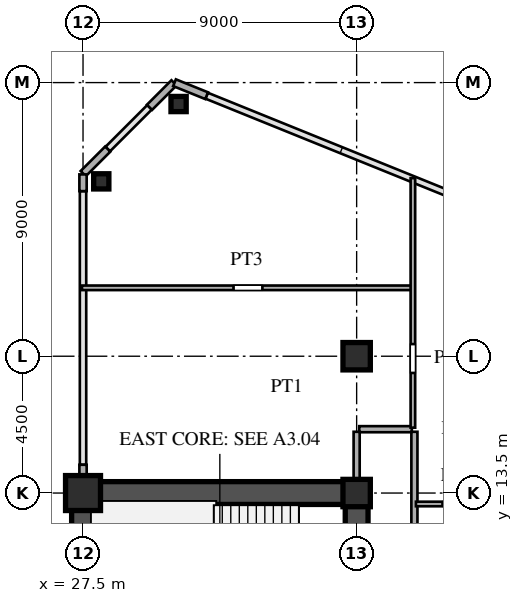
"""IFC4 building model, lengths in metres.
Left out: names, types, materials, properties, quantities, classifications, styles, units other than length and angle.
Written with IfcOpenShell. Run it as: python <this file> out.ifc"""

import sys

from ifc_helpers import new_model, si_unit, direction, frame, frame_2d, origin, origin_2d, place, context, subcontext, project, spatial, rectangle, hollow_rectangle, i_section, extrude, source, transform, mapped, element, save


model = new_model("IFC4")
c1 = context("Model", 3, precision=1e-05, world=origin(), true_north=direction((0.0, 1.0)))
c2 = subcontext(c1, "Body", "Model", "MODEL_VIEW")
j1 = project(units=[si_unit("LENGTHUNIT", "METRE"), si_unit("PLANEANGLEUNIT", "RADIAN")], contexts=[c1])
p1 = place(None, origin())
s1 = spatial("IfcSite", under=j1, at=p1, CompositionType="ELEMENT")
p2 = place(p1, origin())
s2 = spatial("IfcBuilding", under=s1, at=p2, CompositionType="ELEMENT")
p3 = place(p2, frame((0.0, 0.0, 26.1)))
s3 = spatial("IfcBuildingStorey", under=s2, at=p3, CompositionType="ELEMENT", Elevation=26.1)
m1 = source(origin(), c2, "Body", "SweptSolid", [
    extrude(hollow_rectangle(XDim=1.15, YDim=1.15, WallThickness=0.048, at=origin_2d()), origin(), (0.0, 0.0, 1.0), 3.6),
])
p4 = place(p3, frame((27.5, 13.5, 0.0), z_axis=(0.0, 0.0, 1.0), x_axis=(1.0, 0.0, 0.0)))
e1 = element("IfcColumn", 1, at=p4, inside=s3, PredefinedType="COLUMN", context=c2, shape_type="MappedRepresentation", body=[
    mapped(m1, transform((0.0, 0.0, 0.0), scale=1.0)),
])
m2 = source(origin(), c2, "Body", "SweptSolid", [
    extrude(i_section(OverallWidth=0.9, OverallDepth=0.9, WebThickness=0.036, FlangeThickness=0.055, at=origin_2d()), origin(), (0.0, 0.0, 1.0), 3.6),
])
for number, where, z_axis, x_axis in (
    (2, (36.5, 13.5, 0.0), (0.0, 0.0, 1.0), (1.0, 0.0, 0.0)),
    (3, (36.5, 18.0, 0.0), (0.0, 0.0, 1.0), (1.0, 0.0, 0.0)),
):
    element("IfcColumn", number, at=place(p3, frame(where, z_axis=z_axis, x_axis=x_axis)), inside=s3, PredefinedType="COLUMN", context=c2, shape_type="MappedRepresentation", body=[
        mapped(m2, transform((0.0, 0.0, 0.0), scale=1.0)),
    ])
m3 = source(origin(), c2, "Body", "SweptSolid", [
    extrude(hollow_rectangle(XDim=0.5, YDim=0.5, WallThickness=0.02, at=origin_2d()), origin(), (0.0, 0.0, 1.0), 3.6),
])
for number, where, z_axis, x_axis in (
    (4, (30.643, 26.295, 0.0), (0.0, 0.0, 1.0), (1.0, 0.0, 0.0)),
    (5, (28.1, 23.751, 0.0), (0.0, 0.0, 1.0), (1.0, 0.0, 0.0)),
):
    element("IfcColumn", number, at=place(p3, frame(where, z_axis=z_axis, x_axis=x_axis)), inside=s3, PredefinedType="COLUMN", context=c2, shape_type="MappedRepresentation", body=[
        mapped(m3, transform((0.0, 0.0, 0.0), scale=1.0)),
    ])
p5 = place(p3, frame((31.566, 26.569, 0.0), z_axis=(0.0, 0.0, 1.0), x_axis=(-0.927007103665, 0.375043770452, 0.0)))
e6 = element("IfcWall", 6, at=p5, inside=s3, PredefinedType="SOLIDWALL", context=c2, shape_type="SweptSolid", body=[
    extrude(rectangle(XDim=1.14, YDim=0.24, at=frame_2d((0.57, 0.0))), origin(), (0.0, 0.0, 1.0), 3.38),
])
for number, where, z_axis, x_axis in (
    (7, (30.493, 26.993, 0.0), (0.0, 0.0, 1.0), (-0.707, -0.707, 0.0)),
    (8, (28.313, 24.813, 0.0), (0.0, 0.0, 1.0), (-0.707, -0.707, 0.0)),
):
    element("IfcWall", number, at=place(p3, frame(where, z_axis=z_axis, x_axis=x_axis)), inside=s3, PredefinedType="SOLIDWALL", context=c2, shape_type="SweptSolid", body=[
        extrude(rectangle(XDim=1.14, YDim=0.24, at=frame_2d((0.57, 0.0))), origin(), (0.0, 0.0, 1.0), 3.38),
    ])
p6 = place(p3, frame((27.5, 13.88, 0.0), z_axis=(0.0, 0.0, 1.0), x_axis=(0.0, 1.0, 0.0)))
e9 = element("IfcWall", 9, at=p6, inside=s3, PredefinedType="SOLIDWALL", context=c2, shape_type="SweptSolid", body=[
    extrude(rectangle(XDim=0.55, YDim=0.24, at=frame_2d((0.275, 0.0))), origin(), (0.0, 0.0, 1.0), 2.88),
])
p7 = place(p3, frame((27.5, 23.43, 0.0), z_axis=(0.0, 0.0, 1.0), x_axis=(0.0, 1.0, 0.0)))
e10 = element("IfcWall", 10, at=p7, inside=s3, PredefinedType="SOLIDWALL", context=c2, shape_type="SweptSolid", body=[
    extrude(rectangle(XDim=0.55, YDim=0.24, at=frame_2d((0.275, 0.0))), origin(), (0.0, 0.0, 1.0), 3.38),
])
p8 = place(p3, frame((27.5, 1.3, 0.0), z_axis=(0.0, 0.0, 1.0), x_axis=(0.0, 1.0, 0.0)))
e11 = element("IfcWall", 11, at=p8, inside=s3, PredefinedType="SHEAR", context=c2, shape_type="SweptSolid", body=[
    extrude(rectangle(XDim=12.2, YDim=0.75, at=frame_2d((6.1, 0.0))), origin(), (0.0, 0.0, 1.0), 3.38),
])
p9 = place(p3, frame((27.5, 13.5, 0.0), z_axis=(0.0, 0.0, 1.0), x_axis=(1.0, 0.0, 0.0)))
e12 = element("IfcWall", 12, at=p9, inside=s3, PredefinedType="SHEAR", context=c2, shape_type="SweptSolid", body=[
    extrude(rectangle(XDim=9.0, YDim=0.75, at=frame_2d((4.5, 0.0))), origin(), (0.0, 0.0, 1.0), 3.38),
])
p10 = place(p3, frame((36.5, 8.2, 0.0), z_axis=(0.0, 0.0, 1.0), x_axis=(0.0, 1.0, 0.0)))
e13 = element("IfcWall", 13, at=p10, inside=s3, PredefinedType="SHEAR", context=c2, shape_type="SweptSolid", body=[
    extrude(rectangle(XDim=5.45, YDim=0.75, at=frame_2d((2.725, 0.0))), origin(), (0.0, 0.0, 1.0), 3.38),
])
p11 = place(p10, frame((0.245, 0.0, 0.0)))
e14 = element("IfcOpeningElement", 14, at=p11, cuts=e13, PredefinedType="OPENING", context=c2, shape_type="SweptSolid", body=[
    extrude(rectangle(XDim=0.95, YDim=2.15, at=frame_2d((0.475, 1.075))), frame((0.0, 0.385, 0.0), z_axis=(0.0, -1.0, 0.0), x_axis=(1.0, 0.0, 0.0)), (0.0, 0.0, 1.0), 0.77),
])
p12 = place(p3, frame((38.45, 13.14, 0.0), z_axis=(0.0, 0.0, 1.0), x_axis=(1.0, 0.0, 0.0)))
e15 = element("IfcWall", 15, at=p12, inside=s3, PredefinedType="PARTITIONING", context=c2, shape_type="SweptSolid", body=[
    extrude(rectangle(XDim=2.7, YDim=0.15, at=frame_2d((1.35, 0.0))), origin(), (0.0, 0.0, 1.0), 3.38),
])
p13 = place(p12, frame((0.875, 0.0, 0.0)))
e16 = element("IfcOpeningElement", 16, at=p13, cuts=e15, PredefinedType="OPENING", context=c2, shape_type="SweptSolid", body=[
    extrude(rectangle(XDim=0.95, YDim=2.15, at=frame_2d((0.475, 1.075))), frame((0.0, 0.085, 0.0), z_axis=(0.0, -1.0, 0.0), x_axis=(1.0, 0.0, 0.0)), (0.0, 0.0, 1.0), 0.17),
])
p14 = place(p3, frame((36.585, 15.6, 0.0), z_axis=(0.0, 0.0, 1.0), x_axis=(1.0, 0.0, 0.0)))
e17 = element("IfcWall", 17, at=p14, inside=s3, PredefinedType="PARTITIONING", context=c2, shape_type="SweptSolid", body=[
    extrude(rectangle(XDim=1.73, YDim=0.2, at=frame_2d((0.865, 0.0))), origin(), (0.0, 0.0, 1.0), 3.38),
])
p15 = place(p3, frame((27.465, 20.25, 0.0), z_axis=(0.0, 0.0, 1.0), x_axis=(1.0, 0.0, 0.0)))
e18 = element("IfcWall", 18, at=p15, inside=s3, PredefinedType="PARTITIONING", context=c2, shape_type="SweptSolid", body=[
    extrude(rectangle(XDim=10.835, YDim=0.15, at=frame_2d((5.417, 0.0))), origin(), (0.0, 0.0, 1.0), 3.38),
])
p16 = place(p15, frame((4.985, 0.0, 0.0)))
e19 = element("IfcOpeningElement", 19, at=p16, cuts=e18, PredefinedType="OPENING", context=c2, shape_type="SweptSolid", body=[
    extrude(rectangle(XDim=0.95, YDim=2.15, at=frame_2d((0.475, 1.075))), frame((0.0, 0.085, 0.0), z_axis=(0.0, -1.0, 0.0), x_axis=(1.0, 0.0, 0.0)), (0.0, 0.0, 1.0), 0.17),
])
p17 = place(p3, frame((36.5, 13.88, 0.0), z_axis=(0.0, 0.0, 1.0), x_axis=(0.0, 1.0, 0.0)))
e20 = element("IfcWall", 20, at=p17, inside=s3, PredefinedType="PARTITIONING", context=c2, shape_type="SweptSolid", body=[
    extrude(rectangle(XDim=1.635, YDim=0.2, at=frame_2d((0.817, 0.0))), origin(), (0.0, 0.0, 1.0), 2.68),
])
p18 = place(p3, frame((38.35, 15.65, 0.0), z_axis=(0.0, 0.0, 1.0), x_axis=(0.0, 1.0, 0.0)))
e21 = element("IfcWall", 21, at=p18, inside=s3, PredefinedType="PARTITIONING", context=c2, shape_type="SweptSolid", body=[
    extrude(rectangle(XDim=8.208, YDim=0.15, at=frame_2d((4.104, 0.0))), origin(), (0.0, 0.0, 1.0), 3.38),
])
p19 = place(p18, frame((1.8, 0.0, 0.0)))
e22 = element("IfcOpeningElement", 22, at=p19, cuts=e21, PredefinedType="OPENING", context=c2, shape_type="SweptSolid", body=[
    extrude(rectangle(XDim=0.95, YDim=2.15, at=frame_2d((0.475, 1.075))), frame((0.0, 0.085, 0.0), z_axis=(0.0, -1.0, 0.0), x_axis=(1.0, 0.0, 0.0)), (0.0, 0.0, 1.0), 0.17),
])
p20 = place(p3, frame((38.4, -15.515, 0.0), z_axis=(0.0, 0.0, 1.0), x_axis=(0.0, 1.0, 0.0)))
e23 = element("IfcWall", 23, at=p20, inside=s3, PredefinedType="PARTITIONING", context=c2, shape_type="SweptSolid", body=[
    extrude(rectangle(XDim=31.03, YDim=0.2, at=frame_2d((15.515, 0.0))), origin(), (0.0, 0.0, 1.0), 3.38),
])
p21 = place(p20, frame((4.163, 0.0, 0.0)))
e24 = element("IfcOpeningElement", 24, at=p21, cuts=e23, PredefinedType="OPENING", context=c2, shape_type="SweptSolid", body=[
    extrude(rectangle(XDim=1.05, YDim=2.25, at=frame_2d((0.525, 1.125))), frame((0.0, 0.11, 0.0), z_axis=(0.0, -1.0, 0.0), x_axis=(1.0, 0.0, 0.0)), (0.0, 0.0, 1.0), 0.22),
])
p22 = place(p20, frame((15.538, 0.0, 0.0)))
e25 = element("IfcOpeningElement", 25, at=p22, cuts=e23, PredefinedType="OPENING", context=c2, shape_type="SweptSolid", body=[
    extrude(rectangle(XDim=1.05, YDim=2.25, at=frame_2d((0.525, 1.125))), frame((0.0, 0.11, 0.0), z_axis=(0.0, -1.0, 0.0), x_axis=(1.0, 0.0, 0.0)), (0.0, 0.0, 1.0), 0.22),
])
p23 = place(p20, frame((26.635, 0.0, 0.0)))
e26 = element("IfcOpeningElement", 26, at=p23, cuts=e23, PredefinedType="OPENING", context=c2, shape_type="SweptSolid", body=[
    extrude(rectangle(XDim=1.05, YDim=2.25, at=frame_2d((0.525, 1.125))), frame((0.0, 0.11, 0.0), z_axis=(0.0, -1.0, 0.0), x_axis=(1.0, 0.0, 0.0)), (0.0, 0.0, 1.0), 0.22),
])
save(model, sys.argv[1])
